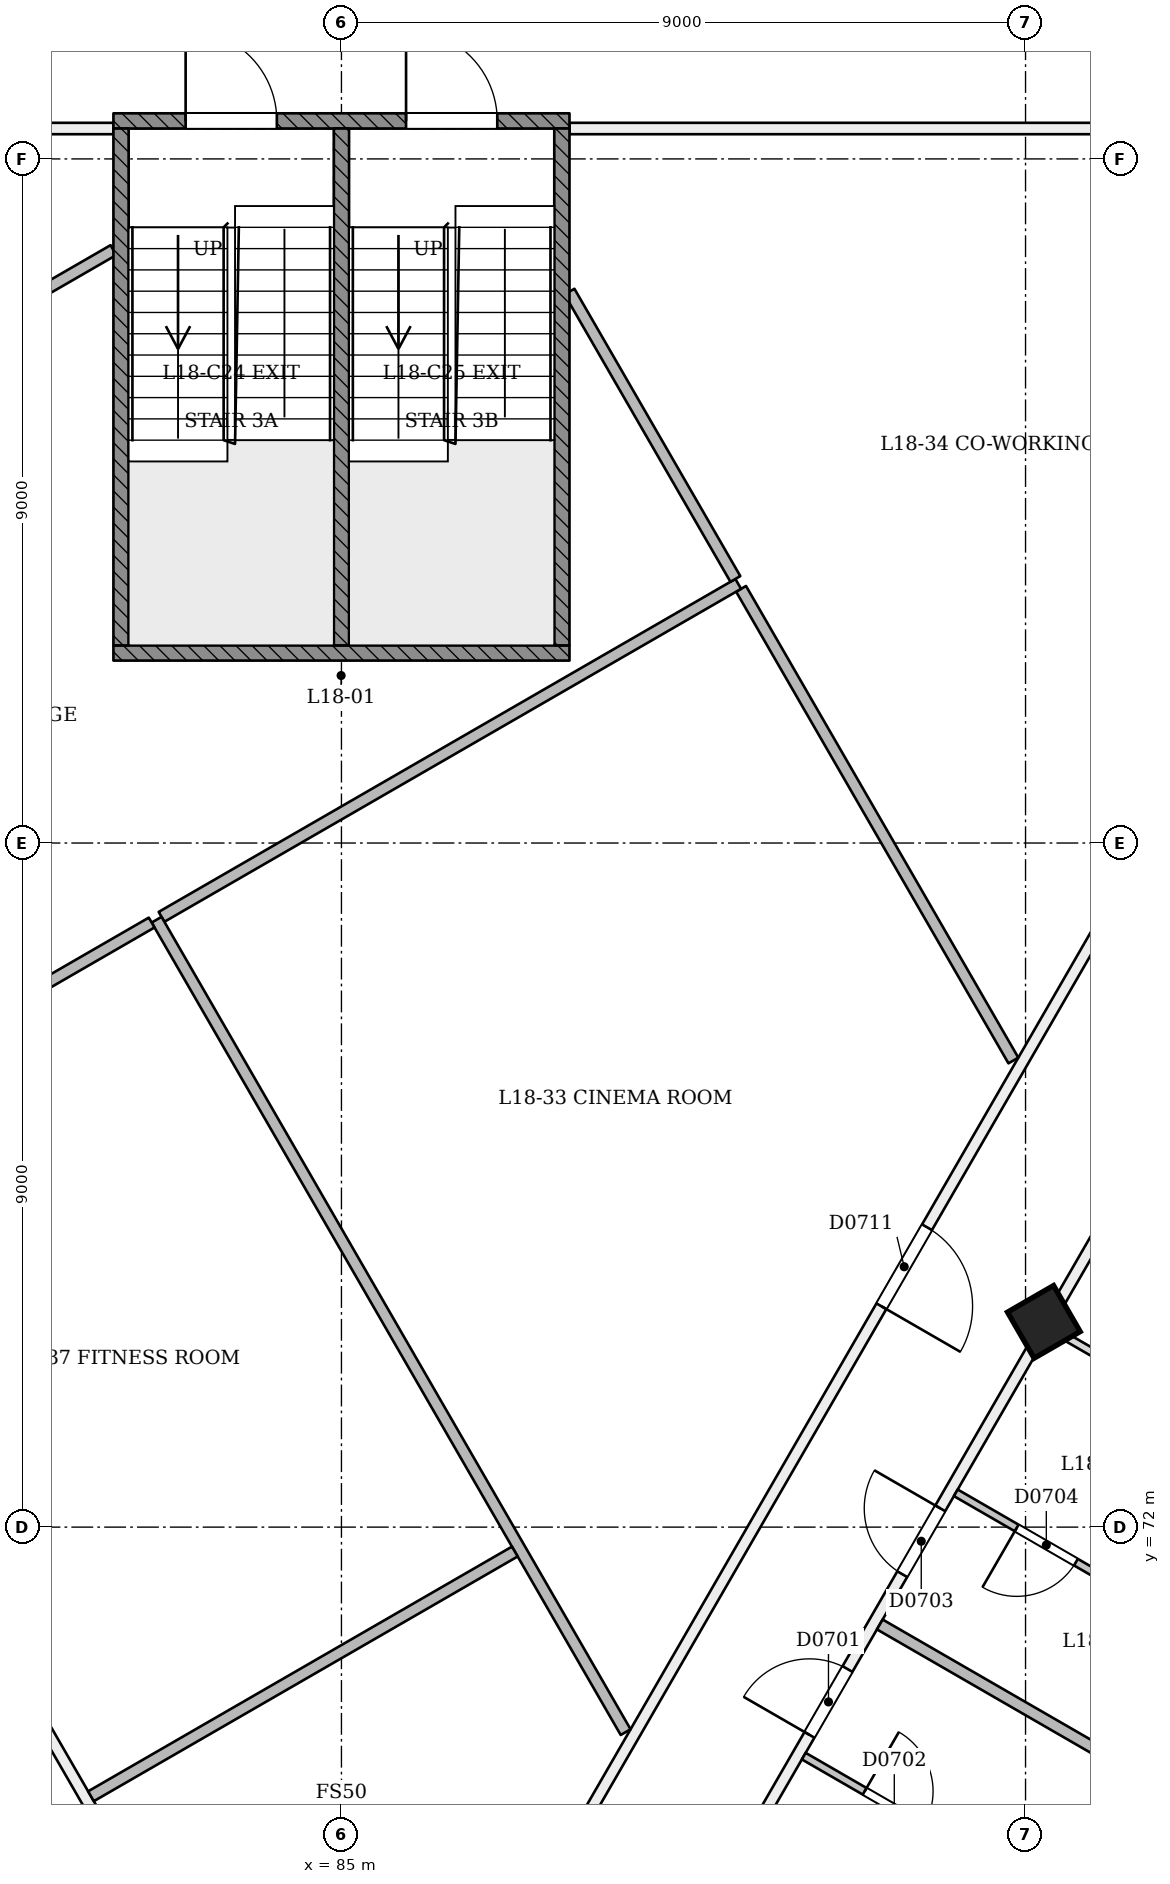
"""IFC4 building model, lengths in metres.
Left out: names, types, materials, properties, quantities, classifications, styles, units other than length and angle.
Written with IfcOpenShell. Run it as: python <this file> out.ifc"""

import sys

from ifc_helpers import new_model, si_unit, direction, frame, frame_2d, origin, origin_2d, place, context, subcontext, project, spatial, rectangle, extrude, element, fill, save


model = new_model("IFC4")
c1 = context("Model", 3, precision=1e-05, world=origin(), true_north=direction((0.0, 1.0)))
c2 = subcontext(c1, "Body", "Model", "MODEL_VIEW")
j1 = project(units=[si_unit("LENGTHUNIT", "METRE"), si_unit("PLANEANGLEUNIT", "RADIAN")], contexts=[c1])
p1 = place(None, origin())
s1 = spatial("IfcSite", under=j1, at=p1, CompositionType="ELEMENT")
p2 = place(p1, origin())
s2 = spatial("IfcBuilding", under=s1, at=p2, CompositionType="ELEMENT")
p3 = place(p2, frame((0.0, 0.0, 73.8)))
s3 = spatial("IfcBuildingStorey", under=s2, at=p3, CompositionType="ELEMENT", Elevation=73.8)
p4 = place(p3, frame((94.268, 74.653, -0.021), z_axis=(-0.022222852987, 0.038483477124, 0.999012095419), x_axis=(-0.500174611287, -0.865639447942, 0.022219459744)))
e1 = element("IfcColumn", 1, at=p4, inside=s3, PredefinedType="COLUMN", context=c2, shape_type="SweptSolid", body=[
    extrude(rectangle(XDim=0.7, YDim=0.7, at=origin_2d()), origin(), (0.0, 0.0, 1.0), 3.604),
])
p5 = place(p3, frame((66.732, 90.242, 0.0), z_axis=(0.0, 0.0, 1.0), x_axis=(0.500004906105, -0.866022571225, 0.0)))
e2 = element("IfcWall", 2, at=p5, inside=s3, PredefinedType="PARTITIONING", context=c2, shape_type="SweptSolid", body=[
    extrude(rectangle(XDim=35.041, YDim=0.15, at=frame_2d((17.521, 0.0))), origin(), (0.0, 0.0, 1.0), 2.7),
])
p6 = place(p5, frame((2.78, 0.0, 0.0)))
e3 = element("IfcOpeningElement", 3, at=p6, cuts=e2, PredefinedType="OPENING", context=c2, shape_type="SweptSolid", body=[
    extrude(rectangle(XDim=1.0, YDim=2.1, at=frame_2d((0.5, 1.05))), frame((0.0, 0.085, 0.0), z_axis=(0.0, -1.0, 0.0), x_axis=(1.0, 0.0, 0.0)), (0.0, 0.0, 1.0), 0.171),
])
p7 = place(p5, frame((7.3, 0.0, 0.0)))
e4 = element("IfcOpeningElement", 4, at=p7, cuts=e2, PredefinedType="OPENING", context=c2, shape_type="SweptSolid", body=[
    extrude(rectangle(XDim=1.2, YDim=2.1, at=frame_2d((0.6, 1.05))), frame((0.0, 0.085, 0.0), z_axis=(0.0, -1.0, 0.0), x_axis=(1.0, 0.0, 0.0)), (0.0, 0.0, 1.0), 0.171),
])
p8 = place(p5, frame((14.105, 0.0, 0.0)))
e5 = element("IfcOpeningElement", 5, at=p8, cuts=e2, PredefinedType="OPENING", context=c2, shape_type="SweptSolid", body=[
    extrude(rectangle(XDim=1.0, YDim=2.1, at=frame_2d((0.5, 1.05))), frame((0.0, 0.085, 0.0), z_axis=(0.0, -1.0, 0.0), x_axis=(1.0, 0.0, 0.0)), (0.0, 0.0, 1.0), 0.171),
])
p9 = place(p5, frame((20.78, 0.0, 0.0)))
e6 = element("IfcOpeningElement", 6, at=p9, cuts=e2, PredefinedType="OPENING", context=c2, shape_type="SweptSolid", body=[
    extrude(rectangle(XDim=1.0, YDim=2.1, at=frame_2d((0.5, 1.05))), frame((0.0, 0.085, 0.0), z_axis=(0.0, -1.0, 0.0), x_axis=(1.0, 0.0, 0.0)), (0.0, 0.0, 1.0), 0.171),
])
p10 = place(p5, frame((24.25, 0.0, 0.0)))
e7 = element("IfcOpeningElement", 7, at=p10, cuts=e2, PredefinedType="OPENING", context=c2, shape_type="SweptSolid", body=[
    extrude(rectangle(XDim=1.0, YDim=2.1, at=frame_2d((0.5, 1.05))), frame((0.0, 0.085, 0.0), z_axis=(0.0, -1.0, 0.0), x_axis=(1.0, 0.0, 0.0)), (0.0, 0.0, 1.0), 0.171),
])
p11 = place(p5, frame((30.473, 0.0, 0.0)))
e8 = element("IfcOpeningElement", 8, at=p11, cuts=e2, PredefinedType="OPENING", context=c2, shape_type="SweptSolid", body=[
    extrude(rectangle(XDim=1.2, YDim=2.1, at=frame_2d((0.6, 1.05))), frame((0.0, 0.085, 0.0), z_axis=(0.0, -1.0, 0.0), x_axis=(1.0, 0.0, 0.0)), (0.0, 0.0, 1.0), 0.171),
])
p12 = place(p3, frame((85.747, 59.896, 0.0), z_axis=(0.0, 0.0, 1.0), x_axis=(0.500002549277, 0.866023931954, 0.0)))
e9 = element("IfcWall", 9, at=p12, inside=s3, PredefinedType="PARTITIONING", context=c2, shape_type="SweptSolid", body=[
    extrude(rectangle(XDim=43.082, YDim=0.15, at=frame_2d((21.541, 0.0))), origin(), (0.0, 0.0, 1.0), 2.7),
])
p13 = place(p12, frame((0.244, 0.0, 0.0)))
e10 = element("IfcOpeningElement", 10, at=p13, cuts=e9, PredefinedType="OPENING", context=c2, shape_type="SweptSolid", body=[
    extrude(rectangle(XDim=1.2, YDim=2.1, at=frame_2d((0.6, 1.05))), frame((0.0, 0.085, 0.0), z_axis=(0.0, -1.0, 0.0), x_axis=(1.0, 0.0, 0.0)), (0.0, 0.0, 1.0), 0.171),
])
p14 = place(p12, frame((4.146, 0.0, 0.0)))
e11 = element("IfcOpeningElement", 11, at=p14, cuts=e9, PredefinedType="OPENING", context=c2, shape_type="SweptSolid", body=[
    extrude(rectangle(XDim=1.0, YDim=2.1, at=frame_2d((0.5, 1.05))), frame((0.0, 0.085, 0.0), z_axis=(0.0, -1.0, 0.0), x_axis=(1.0, 0.0, 0.0)), (0.0, 0.0, 1.0), 0.171),
])
p15 = place(p12, frame((10.821, 0.0, 0.0)))
e12 = element("IfcOpeningElement", 12, at=p15, cuts=e9, PredefinedType="OPENING", context=c2, shape_type="SweptSolid", body=[
    extrude(rectangle(XDim=1.0, YDim=2.1, at=frame_2d((0.5, 1.05))), frame((0.0, 0.085, 0.0), z_axis=(0.0, -1.0, 0.0), x_axis=(1.0, 0.0, 0.0)), (0.0, 0.0, 1.0), 0.171),
])
p16 = place(p12, frame((13.262, 0.0, 0.0)))
e13 = element("IfcOpeningElement", 13, at=p16, cuts=e9, PredefinedType="OPENING", context=c2, shape_type="SweptSolid", body=[
    extrude(rectangle(XDim=1.0, YDim=2.1, at=frame_2d((0.5, 1.05))), frame((0.0, 0.085, 0.0), z_axis=(0.0, -1.0, 0.0), x_axis=(1.0, 0.0, 0.0)), (0.0, 0.0, 1.0), 0.171),
])
p17 = place(p12, frame((20.941, 0.0, 0.0)))
e14 = element("IfcOpeningElement", 14, at=p17, cuts=e9, PredefinedType="OPENING", context=c2, shape_type="SweptSolid", body=[
    extrude(rectangle(XDim=1.2, YDim=2.1, at=frame_2d((0.6, 1.05))), frame((0.0, 0.085, 0.0), z_axis=(0.0, -1.0, 0.0), x_axis=(1.0, 0.0, 0.0)), (0.0, 0.0, 1.0), 0.171),
])
p18 = place(p12, frame((28.821, 0.0, 0.0)))
e15 = element("IfcOpeningElement", 15, at=p18, cuts=e9, PredefinedType="OPENING", context=c2, shape_type="SweptSolid", body=[
    extrude(rectangle(XDim=1.0, YDim=2.1, at=frame_2d((0.5, 1.05))), frame((0.0, 0.085, 0.0), z_axis=(0.0, -1.0, 0.0), x_axis=(1.0, 0.0, 0.0)), (0.0, 0.0, 1.0), 0.171),
])
p19 = place(p12, frame((31.112, 0.0, 0.0)))
e16 = element("IfcOpeningElement", 16, at=p19, cuts=e9, PredefinedType="OPENING", context=c2, shape_type="SweptSolid", body=[
    extrude(rectangle(XDim=1.1, YDim=2.1, at=frame_2d((0.55, 1.05))), frame((0.0, 0.085, 0.0), z_axis=(0.0, -1.0, 0.0), x_axis=(1.0, 0.0, 0.0)), (0.0, 0.0, 1.0), 0.171),
])
p20 = place(p12, frame((38.514, 0.0, 0.0)))
e17 = element("IfcOpeningElement", 17, at=p20, cuts=e9, PredefinedType="OPENING", context=c2, shape_type="SweptSolid", body=[
    extrude(rectangle(XDim=1.2, YDim=2.1, at=frame_2d((0.6, 1.05))), frame((0.0, 0.085, 0.0), z_axis=(0.0, -1.0, 0.0), x_axis=(1.0, 0.0, 0.0)), (0.0, 0.0, 1.0), 0.171),
])
p21 = place(p3, frame((101.049, 90.4, 0.0), z_axis=(0.0, 0.0, 1.0), x_axis=(-0.500000325473, -0.866025215872, 0.0)))
e18 = element("IfcWall", 18, at=p21, inside=s3, PredefinedType="PARTITIONING", context=c2, shape_type="SweptSolid", body=[
    extrude(rectangle(XDim=31.968, YDim=0.15, at=frame_2d((15.984, 0.0))), origin(), (0.0, 0.0, 1.0), 3.1),
])
p22 = place(p21, frame((16.691, 0.0, 0.0)))
e19 = element("IfcOpeningElement", 19, at=p22, cuts=e18, PredefinedType="OPENING", context=c2, shape_type="SweptSolid", body=[
    extrude(rectangle(XDim=1.2, YDim=2.1, at=frame_2d((0.6, 1.05))), frame((0.0, 0.085, 0.0), z_axis=(0.0, -1.0, 0.0), x_axis=(1.0, 0.0, 0.0)), (0.0, 0.0, 1.0), 0.171),
])
p23 = place(p21, frame((6.541, 0.0, 0.0)))
e20 = element("IfcOpeningElement", 20, at=p23, cuts=e18, PredefinedType="OPENING", context=c2, shape_type="SweptSolid", body=[
    extrude(rectangle(XDim=1.2, YDim=2.1, at=frame_2d((0.6, 1.05))), frame((0.0, 0.085, 0.0), z_axis=(0.0, -1.0, 0.0), x_axis=(1.0, 0.0, 0.0)), (0.0, 0.0, 1.0), 0.171),
])
p24 = place(p3, frame((88.0, 90.4, 0.0), z_axis=(0.0, 0.0, 1.0), x_axis=(1.0, 0.0, 0.0)))
e21 = element("IfcWall", 21, at=p24, inside=s3, PredefinedType="PARTITIONING", context=c2, shape_type="SweptSolid", body=[
    extrude(rectangle(XDim=12.919, YDim=0.15, at=frame_2d((6.459, 0.0))), origin(), (0.0, 0.0, 1.0), 3.1),
])
p25 = place(p3, frame((85.0, 62.602, 0.0), z_axis=(0.0, 0.0, 1.0), x_axis=(-0.500002713669, 0.866023837041, 0.0)))
e22 = element("IfcWall", 22, at=p25, inside=s3, PredefinedType="PARTITIONING", context=c2, shape_type="SweptSolid", body=[
    extrude(rectangle(XDim=32.098, YDim=0.15, at=frame_2d((16.049, 0.0))), origin(), (0.0, 0.0, 1.0), 3.1),
])
p26 = place(p25, frame((19.332, 0.0, 0.0)))
e23 = element("IfcOpeningElement", 23, at=p26, cuts=e22, PredefinedType="OPENING", context=c2, shape_type="SweptSolid", body=[
    extrude(rectangle(XDim=1.2, YDim=2.1, at=frame_2d((0.6, 1.05))), frame((0.0, 0.085, 0.0), z_axis=(0.0, -1.0, 0.0), x_axis=(1.0, 0.0, 0.0)), (0.0, 0.0, 1.0), 0.171),
])
p27 = place(p25, frame((10.898, 0.0, 0.0)))
e24 = element("IfcOpeningElement", 24, at=p27, cuts=e22, PredefinedType="OPENING", context=c2, shape_type="SweptSolid", body=[
    extrude(rectangle(XDim=1.2, YDim=2.1, at=frame_2d((0.6, 1.05))), frame((0.0, 0.085, 0.0), z_axis=(0.0, -1.0, 0.0), x_axis=(1.0, 0.0, 0.0)), (0.0, 0.0, 1.0), 0.171),
])
p28 = place(p25, frame((26.318, 0.0, 0.0)))
e25 = element("IfcOpeningElement", 25, at=p28, cuts=e22, PredefinedType="OPENING", context=c2, shape_type="SweptSolid", body=[
    extrude(rectangle(XDim=1.2, YDim=2.1, at=frame_2d((0.6, 1.05))), frame((0.0, 0.085, 0.0), z_axis=(0.0, -1.0, 0.0), x_axis=(1.0, 0.0, 0.0)), (0.0, 0.0, 1.0), 0.171),
])
p29 = place(p25, frame((3.686, 0.0, 0.0)))
e26 = element("IfcOpeningElement", 26, at=p29, cuts=e22, PredefinedType="OPENING", context=c2, shape_type="SweptSolid", body=[
    extrude(rectangle(XDim=1.0, YDim=2.1, at=frame_2d((0.5, 1.05))), frame((0.0, 0.085, 0.0), z_axis=(0.0, -1.0, 0.0), x_axis=(1.0, 0.0, 0.0)), (0.0, 0.0, 1.0), 0.171),
])
p30 = place(p3, frame((69.081, 90.4, 0.0), z_axis=(0.0, 0.0, 1.0), x_axis=(1.0, 0.0, 0.0)))
e27 = element("IfcWall", 27, at=p30, inside=s3, PredefinedType="PARTITIONING", context=c2, shape_type="SweptSolid", body=[
    extrude(rectangle(XDim=12.919, YDim=0.15, at=frame_2d((6.459, 0.0))), origin(), (0.0, 0.0, 1.0), 3.1),
])
p31 = place(p3, frame((91.083, 68.987, 0.0), z_axis=(0.0, 0.0, 1.0), x_axis=(0.866011447264, -0.500024172624, 0.0)))
e28 = element("IfcWall", 28, at=p31, inside=s3, PredefinedType="PARTITIONING", context=c2, shape_type="SweptSolid", body=[
    extrude(rectangle(XDim=2.825, YDim=0.1, at=frame_2d((1.413, 0.0))), origin(), (0.0, 0.0, 1.0), 3.1),
])
p32 = place(p31, frame((0.925, 0.0, 0.0)))
e29 = element("IfcOpeningElement", 29, at=p32, cuts=e28, PredefinedType="OPENING", context=c2, shape_type="SweptSolid", body=[
    extrude(rectangle(XDim=0.9, YDim=2.1, at=frame_2d((0.45, 1.05))), frame((0.0, 0.061, 0.0), z_axis=(0.0, -1.0, 0.0), x_axis=(1.0, 0.0, 0.0)), (0.0, 0.0, 1.0), 0.121),
])
p33 = place(p3, frame((97.578, 67.547, 0.0), z_axis=(0.0, 0.0, 1.0), x_axis=(-0.866025401434, 0.500000004071, 0.0)))
e30 = element("IfcWall", 30, at=p33, inside=s3, PredefinedType="PARTITIONING", context=c2, shape_type="SweptSolid", body=[
    extrude(rectangle(XDim=6.345, YDim=0.15, at=frame_2d((3.173, 0.0))), origin(), (0.0, 0.0, 1.0), 2.6),
])
p34 = place(p3, frame((95.529, 71.039, 0.0), z_axis=(0.0, 0.0, 1.0), x_axis=(-0.866011447264, 0.500024172624, 0.0)))
e31 = element("IfcWall", 31, at=p34, inside=s3, PredefinedType="PARTITIONING", context=c2, shape_type="SweptSolid", body=[
    extrude(rectangle(XDim=2.825, YDim=0.1, at=frame_2d((1.413, 0.0))), origin(), (0.0, 0.0, 1.0), 3.1),
])
p35 = place(p34, frame((1.0, 0.0, 0.0)))
e32 = element("IfcOpeningElement", 32, at=p35, cuts=e31, PredefinedType="OPENING", context=c2, shape_type="SweptSolid", body=[
    extrude(rectangle(XDim=0.9, YDim=2.1, at=frame_2d((0.45, 1.05))), frame((0.0, 0.061, 0.0), z_axis=(0.0, -1.0, 0.0), x_axis=(1.0, 0.0, 0.0)), (0.0, 0.0, 1.0), 0.121),
])
p36 = place(p3, frame((99.81, 71.454, 0.0), z_axis=(0.0, 0.0, 1.0), x_axis=(-0.866032601554, 0.49998753289, 0.0)))
e33 = element("IfcWall", 33, at=p36, inside=s3, PredefinedType="PARTITIONING", context=c2, shape_type="SweptSolid", body=[
    extrude(rectangle(XDim=6.325, YDim=0.1, at=frame_2d((3.163, 0.0))), origin(), (0.0, 0.0, 1.0), 2.6),
])
p37 = place(p3, frame((93.84, 78.139, 0.0), z_axis=(0.0, 0.0, 1.0), x_axis=(-0.500001675373, 0.866024436505, 0.0)))
e34 = element("IfcWall", 34, at=p37, inside=s3, PredefinedType="PARTITIONING", context=c2, shape_type="SweptSolid", body=[
    extrude(rectangle(XDim=7.165, YDim=0.15, at=frame_2d((3.583, 0.0))), origin(), (0.0, 0.0, 1.0), 3.1),
])
p38 = place(p3, frame((90.22, 84.409, 0.0), z_axis=(0.0, 0.0, 1.0), x_axis=(-0.866022229689, -0.500005497654, 0.0)))
e35 = element("IfcWall", 35, at=p38, inside=s3, PredefinedType="PARTITIONING", context=c2, shape_type="SweptSolid", body=[
    extrude(rectangle(XDim=8.761, YDim=0.15, at=frame_2d((4.38, 0.0))), origin(), (0.0, 0.0, 1.0), 3.1),
])
p39 = place(p3, frame((82.568, 79.991, 0.0), z_axis=(0.0, 0.0, 1.0), x_axis=(0.499987872132, -0.866032405699, 0.0)))
e36 = element("IfcWall", 36, at=p39, inside=s3, PredefinedType="PARTITIONING", context=c2, shape_type="SweptSolid", body=[
    extrude(rectangle(XDim=12.342, YDim=0.15, at=frame_2d((6.171, 0.0))), origin(), (0.0, 0.0, 1.0), 3.1),
])
p40 = place(p3, frame((88.0, 88.254, 0.0), z_axis=(0.0, 0.0, 1.0), x_axis=(0.500012937857, -0.86601793398, 0.0)))
e37 = element("IfcWall", 37, at=p40, inside=s3, PredefinedType="PARTITIONING", context=c2, shape_type="SweptSolid", body=[
    extrude(rectangle(XDim=4.365, YDim=0.15, at=frame_2d((2.183, 0.0))), origin(), (0.0, 0.0, 1.0), 3.1),
])
p41 = place(p3, frame((76.927, 76.734, 0.0), z_axis=(0.0, 0.0, 1.0), x_axis=(0.866027091653, 0.499997076515, 0.0)))
e38 = element("IfcWall", 38, at=p41, inside=s3, PredefinedType="PARTITIONING", context=c2, shape_type="SweptSolid", body=[
    extrude(rectangle(XDim=6.438, YDim=0.15, at=frame_2d((3.219, 0.0))), origin(), (0.0, 0.0, 1.0), 3.1),
])
p42 = place(p3, frame((82.0, 88.8, 0.0), z_axis=(0.0, 0.0, 1.0), x_axis=(-0.866026874108, -0.499997453315, 0.0)))
e39 = element("IfcWall", 39, at=p42, inside=s3, PredefinedType="PARTITIONING", context=c2, shape_type="SweptSolid", body=[
    extrude(rectangle(XDim=10.426, YDim=0.15, at=frame_2d((5.213, 0.0))), origin(), (0.0, 0.0, 1.0), 3.1),
])
p43 = place(p3, frame((81.705, 68.459, 0.0), z_axis=(0.0, 0.0, 1.0), x_axis=(0.866034031594, 0.499985055897, 0.0)))
e40 = element("IfcWall", 40, at=p43, inside=s3, PredefinedType="PARTITIONING", context=c2, shape_type="SweptSolid", body=[
    extrude(rectangle(XDim=6.438, YDim=0.15, at=frame_2d((3.219, 0.0))), origin(), (0.0, 0.0, 1.0), 3.1),
])
p44 = place(p3, frame((82.0, 90.5, 0.0), z_axis=(0.0, 0.0, 1.0), x_axis=(1.0, 0.0, 0.0)))
e41 = element("IfcWall", 41, at=p44, inside=s3, PredefinedType="SOLIDWALL", context=c2, shape_type="SweptSolid", body=[
    extrude(rectangle(XDim=6.0, YDim=0.2, at=frame_2d((3.0, 0.0))), origin(), (0.0, 0.0, 1.0), 3.1),
])
p45 = place(p44, frame((0.95, 0.0, 0.0)))
e42 = element("IfcOpeningElement", 42, at=p45, cuts=e41, PredefinedType="OPENING", context=c2, shape_type="SweptSolid", body=[
    extrude(rectangle(XDim=1.2, YDim=2.1, at=frame_2d((0.6, 1.05))), frame((0.0, 0.11, 0.0), z_axis=(0.0, -1.0, 0.0), x_axis=(1.0, 0.0, 0.0)), (0.0, 0.0, 1.0), 0.221),
])
p46 = place(p44, frame((3.85, 0.0, 0.0)))
e43 = element("IfcOpeningElement", 43, at=p46, cuts=e41, PredefinedType="OPENING", context=c2, shape_type="SweptSolid", body=[
    extrude(rectangle(XDim=1.2, YDim=2.1, at=frame_2d((0.6, 1.05))), frame((0.0, 0.11, 0.0), z_axis=(0.0, -1.0, 0.0), x_axis=(1.0, 0.0, 0.0)), (0.0, 0.0, 1.0), 0.221),
])
p47 = place(p3, frame((82.0, 83.5, 0.0), z_axis=(0.0, 0.0, 1.0), x_axis=(1.0, 0.0, 0.0)))
e44 = element("IfcWall", 44, at=p47, inside=s3, PredefinedType="SOLIDWALL", context=c2, shape_type="SweptSolid", body=[
    extrude(rectangle(XDim=6.0, YDim=0.2, at=frame_2d((3.0, 0.0))), origin(), (0.0, 0.0, 1.0), 3.1),
])
for number, where, z_axis, x_axis in (
    (45, (82.1, 83.6, 0.0), (0.0, 0.0, 1.0), (0.0, 1.0, 0.0)),
    (46, (87.9, 83.6, 0.0), (0.0, 0.0, 1.0), (0.0, 1.0, 0.0)),
    (47, (85.0, 83.6, 0.0), (0.0, 0.0, 1.0), (0.0, 1.0, 0.0)),
):
    element("IfcWall", number, at=place(p3, frame(where, z_axis=z_axis, x_axis=x_axis)), inside=s3, PredefinedType="SOLIDWALL", context=c2, shape_type="SweptSolid", body=[
        extrude(rectangle(XDim=6.8, YDim=0.2, at=frame_2d((3.4, 0.0))), origin(), (0.0, 0.0, 1.0), 3.1),
    ])
p48 = place(p15, origin())
e48 = element("IfcDoor", 48, at=p48, inside=s3, OperationType="SINGLE_SWING_LEFT", PredefinedType="NOTDEFINED", context=c2, shape_type="SweptSolid", body=[
    extrude(rectangle(XDim=1.0, YDim=2.1, at=frame_2d((0.5, 1.05))), frame((0.0, 0.025, 0.0), z_axis=(0.0, -1.0, 0.0), x_axis=(1.0, 0.0, 0.0)), (0.0, 0.0, 1.0), 0.05),
])
fill(e12, e48)
p49 = place(p32, origin())
e49 = element("IfcDoor", 49, at=p49, inside=s3, OperationType="SINGLE_SWING_LEFT", PredefinedType="NOTDEFINED", context=c2, shape_type="SweptSolid", body=[
    extrude(rectangle(XDim=0.9, YDim=2.1, at=frame_2d((0.45, 1.05))), frame((0.0, 0.025, 0.0), z_axis=(0.0, -1.0, 0.0), x_axis=(1.0, 0.0, 0.0)), (0.0, 0.0, 1.0), 0.05),
])
fill(e29, e49)
p50 = place(p16, origin())
e50 = element("IfcDoor", 50, at=p50, inside=s3, OperationType="SINGLE_SWING_RIGHT", PredefinedType="NOTDEFINED", context=c2, shape_type="SweptSolid", body=[
    extrude(rectangle(XDim=1.0, YDim=2.1, at=frame_2d((0.5, 1.05))), frame((0.0, 0.025, 0.0), z_axis=(0.0, -1.0, 0.0), x_axis=(1.0, 0.0, 0.0)), (0.0, 0.0, 1.0), 0.05),
])
fill(e13, e50)
p51 = place(p35, origin())
e51 = element("IfcDoor", 51, at=p51, inside=s3, OperationType="SINGLE_SWING_RIGHT", PredefinedType="NOTDEFINED", context=c2, shape_type="SweptSolid", body=[
    extrude(rectangle(XDim=0.9, YDim=2.1, at=frame_2d((0.45, 1.05))), frame((0.0, 0.025, 0.0), z_axis=(0.0, -1.0, 0.0), x_axis=(1.0, 0.0, 0.0)), (0.0, 0.0, 1.0), 0.05),
])
fill(e32, e51)
p52 = place(p22, origin())
e52 = element("IfcDoor", 52, at=p52, inside=s3, OperationType="SINGLE_SWING_RIGHT", PredefinedType="NOTDEFINED", context=c2, shape_type="SweptSolid", body=[
    extrude(rectangle(XDim=1.2, YDim=2.1, at=frame_2d((0.6, 1.05))), frame((0.0, 0.025, 0.0), z_axis=(0.0, -1.0, 0.0), x_axis=(1.0, 0.0, 0.0)), (0.0, 0.0, 1.0), 0.05),
])
fill(e19, e52)
p53 = place(p45, origin())
e53 = element("IfcDoor", 53, at=p53, inside=s3, OperationType="SINGLE_SWING_LEFT", PredefinedType="NOTDEFINED", context=c2, shape_type="SweptSolid", body=[
    extrude(rectangle(XDim=1.2, YDim=2.1, at=frame_2d((0.6, 1.05))), frame((0.0, 0.025, 0.0), z_axis=(0.0, -1.0, 0.0), x_axis=(1.0, 0.0, 0.0)), (0.0, 0.0, 1.0), 0.05),
])
fill(e42, e53)
p54 = place(p46, origin())
e54 = element("IfcDoor", 54, at=p54, inside=s3, OperationType="SINGLE_SWING_LEFT", PredefinedType="NOTDEFINED", context=c2, shape_type="SweptSolid", body=[
    extrude(rectangle(XDim=1.2, YDim=2.1, at=frame_2d((0.6, 1.05))), frame((0.0, 0.025, 0.0), z_axis=(0.0, -1.0, 0.0), x_axis=(1.0, 0.0, 0.0)), (0.0, 0.0, 1.0), 0.05),
])
fill(e43, e54)
save(model, sys.argv[1])
